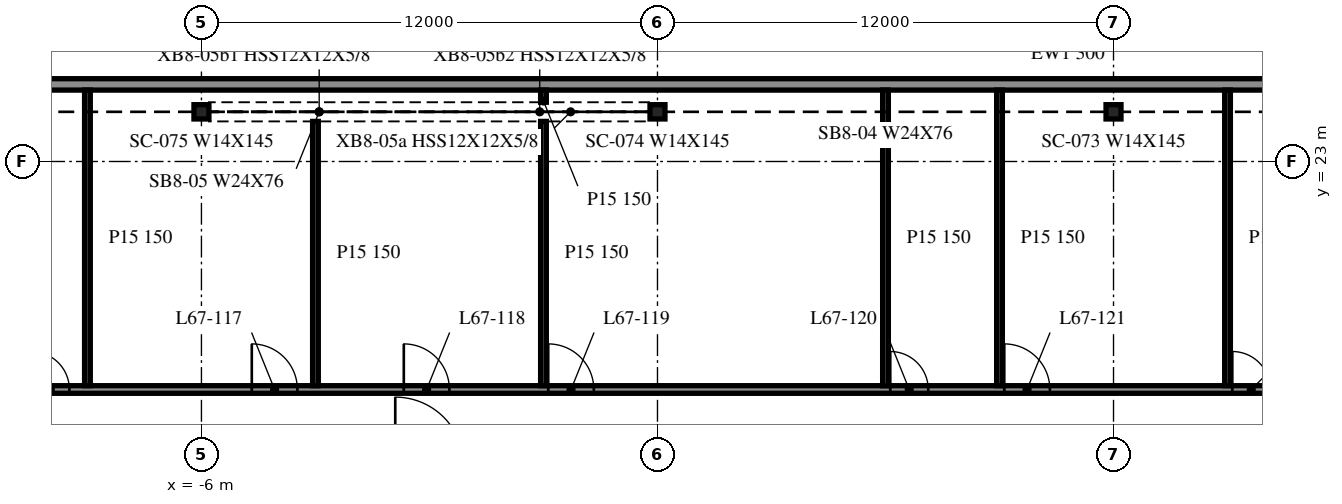
"""IFC4 building model, lengths in metres.
Left out: names, types, materials, properties, quantities, classifications, styles, units other than length and angle.
Written with IfcOpenShell. Run it as: python <this file> out.ifc"""

import sys

from ifc_helpers import new_model, si_unit, direction, frame, frame_2d, origin, origin_2d, place, context, subcontext, project, spatial, rectangle, i_section, extrude, element, fill, save


model = new_model("IFC4")
c1 = context("Model", 3, precision=1e-05, world=origin(), true_north=direction((0.0, 1.0)))
c2 = subcontext(c1, "Body", "Model", "MODEL_VIEW")
j1 = project(units=[si_unit("LENGTHUNIT", "METRE"), si_unit("PLANEANGLEUNIT", "RADIAN")], contexts=[c1])
p1 = place(None, origin())
s1 = spatial("IfcSite", under=j1, at=p1, CompositionType="ELEMENT")
p2 = place(p1, origin())
s2 = spatial("IfcBuilding", under=s1, at=p2, CompositionType="ELEMENT")
p3 = place(p2, frame((0.0, 0.0, 274.7)))
s3 = spatial("IfcBuildingStorey", under=s2, at=p3, CompositionType="ELEMENT", Elevation=274.7)
for number, where, z_axis, x_axis in (
    (1, (18.0, 24.307, -0.34), (0.0, 0.0, 1.0), (1.0, 0.0, 0.0)),
    (2, (6.0, 24.307, -0.34), (0.0, 0.0, 1.0), (1.0, 0.0, 0.0)),
    (3, (-6.0, 24.307, -0.34), (0.0, 0.0, 1.0), (1.0, 0.0, 0.0)),
):
    element("IfcColumn", number, at=place(p3, frame(where, z_axis=z_axis, x_axis=x_axis)), inside=s3, PredefinedType="COLUMN", context=c2, shape_type="SweptSolid", body=[
        extrude(i_section(OverallWidth=0.394, OverallDepth=0.376, WebThickness=0.017, FlangeThickness=0.028, at=origin_2d()), origin(), (0.0, 0.0, 1.0), 3.8),
    ])
p4 = place(p3, frame((42.0, 25.029, 0.0), z_axis=(0.0, 0.0, 1.0), x_axis=(-1.0, 0.0, 0.0)))
e4 = element("IfcWall", 4, at=p4, inside=s3, PredefinedType="NOTDEFINED", context=c2, shape_type="SweptSolid", body=[
    extrude(rectangle(XDim=84.0, YDim=0.3, at=frame_2d((42.0, 0.0))), origin(), (0.0, 0.0, 1.0), 2.853),
])
p5 = place(p3, frame((-47.975, 17.0, 0.0), z_axis=(0.0, 0.0, 1.0), x_axis=(1.0, 0.0, 0.0)))
e5 = element("IfcWall", 5, at=p5, inside=s3, PredefinedType="PARTITIONING", context=c2, shape_type="SweptSolid", body=[
    extrude(rectangle(XDim=95.95, YDim=0.2, at=frame_2d((47.975, 0.0))), origin(), (0.0, 0.0, 1.0), 3.46),
])
p6 = place(p5, frame((7.3, 0.0, 0.0)))
e6 = element("IfcOpeningElement", 6, at=p6, cuts=e5, PredefinedType="OPENING", context=c2, shape_type="SweptSolid", body=[
    extrude(rectangle(XDim=1.2, YDim=2.1, at=frame_2d((0.6, 1.05))), frame((0.0, 0.11, 0.0), z_axis=(0.0, -1.0, 0.0), x_axis=(1.0, 0.0, 0.0)), (0.0, 0.0, 1.0), 0.22),
])
p7 = place(p5, frame((13.3, 0.0, 0.0)))
e7 = element("IfcOpeningElement", 7, at=p7, cuts=e5, PredefinedType="OPENING", context=c2, shape_type="SweptSolid", body=[
    extrude(rectangle(XDim=1.2, YDim=2.1, at=frame_2d((0.6, 1.05))), frame((0.0, 0.11, 0.0), z_axis=(0.0, -1.0, 0.0), x_axis=(1.0, 0.0, 0.0)), (0.0, 0.0, 1.0), 0.22),
])
p8 = place(p5, frame((19.3, 0.0, 0.0)))
e8 = element("IfcOpeningElement", 8, at=p8, cuts=e5, PredefinedType="OPENING", context=c2, shape_type="SweptSolid", body=[
    extrude(rectangle(XDim=1.2, YDim=2.1, at=frame_2d((0.6, 1.05))), frame((0.0, 0.11, 0.0), z_axis=(0.0, -1.0, 0.0), x_axis=(1.0, 0.0, 0.0)), (0.0, 0.0, 1.0), 0.22),
])
p9 = place(p5, frame((28.5, 0.0, 0.0)))
e9 = element("IfcOpeningElement", 9, at=p9, cuts=e5, PredefinedType="OPENING", context=c2, shape_type="SweptSolid", body=[
    extrude(rectangle(XDim=1.0, YDim=2.1, at=frame_2d((0.5, 1.05))), frame((0.0, 0.11, 0.0), z_axis=(0.0, -1.0, 0.0), x_axis=(1.0, 0.0, 0.0)), (0.0, 0.0, 1.0), 0.22),
])
p10 = place(p5, frame((31.3, 0.0, 0.0)))
e10 = element("IfcOpeningElement", 10, at=p10, cuts=e5, PredefinedType="OPENING", context=c2, shape_type="SweptSolid", body=[
    extrude(rectangle(XDim=1.2, YDim=2.1, at=frame_2d((0.6, 1.05))), frame((0.0, 0.11, 0.0), z_axis=(0.0, -1.0, 0.0), x_axis=(1.0, 0.0, 0.0)), (0.0, 0.0, 1.0), 0.22),
])
p11 = place(p5, frame((37.5, 0.0, 0.0)))
e11 = element("IfcOpeningElement", 11, at=p11, cuts=e5, PredefinedType="OPENING", context=c2, shape_type="SweptSolid", body=[
    extrude(rectangle(XDim=1.0, YDim=2.1, at=frame_2d((0.5, 1.05))), frame((0.0, 0.11, 0.0), z_axis=(0.0, -1.0, 0.0), x_axis=(1.0, 0.0, 0.0)), (0.0, 0.0, 1.0), 0.22),
])
p12 = place(p5, frame((43.3, 0.0, 0.0)))
e12 = element("IfcOpeningElement", 12, at=p12, cuts=e5, PredefinedType="OPENING", context=c2, shape_type="SweptSolid", body=[
    extrude(rectangle(XDim=1.2, YDim=2.1, at=frame_2d((0.6, 1.05))), frame((0.0, 0.11, 0.0), z_axis=(0.0, -1.0, 0.0), x_axis=(1.0, 0.0, 0.0)), (0.0, 0.0, 1.0), 0.22),
])
p13 = place(p5, frame((47.3, 0.0, 0.0)))
e13 = element("IfcOpeningElement", 13, at=p13, cuts=e5, PredefinedType="OPENING", context=c2, shape_type="SweptSolid", body=[
    extrude(rectangle(XDim=1.2, YDim=2.1, at=frame_2d((0.6, 1.05))), frame((0.0, 0.11, 0.0), z_axis=(0.0, -1.0, 0.0), x_axis=(1.0, 0.0, 0.0)), (0.0, 0.0, 1.0), 0.22),
])
p14 = place(p5, frame((51.1, 0.0, 0.0)))
e14 = element("IfcOpeningElement", 14, at=p14, cuts=e5, PredefinedType="OPENING", context=c2, shape_type="SweptSolid", body=[
    extrude(rectangle(XDim=1.2, YDim=2.1, at=frame_2d((0.6, 1.05))), frame((0.0, 0.11, 0.0), z_axis=(0.0, -1.0, 0.0), x_axis=(1.0, 0.0, 0.0)), (0.0, 0.0, 1.0), 0.22),
])
p15 = place(p5, frame((60.1, 0.0, 0.0)))
e15 = element("IfcOpeningElement", 15, at=p15, cuts=e5, PredefinedType="OPENING", context=c2, shape_type="SweptSolid", body=[
    extrude(rectangle(XDim=1.0, YDim=2.1, at=frame_2d((0.5, 1.05))), frame((0.0, 0.11, 0.0), z_axis=(0.0, -1.0, 0.0), x_axis=(1.0, 0.0, 0.0)), (0.0, 0.0, 1.0), 0.22),
])
p16 = place(p5, frame((63.1, 0.0, 0.0)))
e16 = element("IfcOpeningElement", 16, at=p16, cuts=e5, PredefinedType="OPENING", context=c2, shape_type="SweptSolid", body=[
    extrude(rectangle(XDim=1.2, YDim=2.1, at=frame_2d((0.6, 1.05))), frame((0.0, 0.11, 0.0), z_axis=(0.0, -1.0, 0.0), x_axis=(1.0, 0.0, 0.0)), (0.0, 0.0, 1.0), 0.22),
])
p17 = place(p5, frame((69.1, 0.0, 0.0)))
e17 = element("IfcOpeningElement", 17, at=p17, cuts=e5, PredefinedType="OPENING", context=c2, shape_type="SweptSolid", body=[
    extrude(rectangle(XDim=1.0, YDim=2.1, at=frame_2d((0.5, 1.05))), frame((0.0, 0.11, 0.0), z_axis=(0.0, -1.0, 0.0), x_axis=(1.0, 0.0, 0.0)), (0.0, 0.0, 1.0), 0.22),
])
p18 = place(p5, frame((75.1, 0.0, 0.0)))
e18 = element("IfcOpeningElement", 18, at=p18, cuts=e5, PredefinedType="OPENING", context=c2, shape_type="SweptSolid", body=[
    extrude(rectangle(XDim=1.2, YDim=2.1, at=frame_2d((0.6, 1.05))), frame((0.0, 0.11, 0.0), z_axis=(0.0, -1.0, 0.0), x_axis=(1.0, 0.0, 0.0)), (0.0, 0.0, 1.0), 0.22),
])
p19 = place(p5, frame((81.1, 0.0, 0.0)))
e19 = element("IfcOpeningElement", 19, at=p19, cuts=e5, PredefinedType="OPENING", context=c2, shape_type="SweptSolid", body=[
    extrude(rectangle(XDim=1.2, YDim=2.1, at=frame_2d((0.6, 1.05))), frame((0.0, 0.11, 0.0), z_axis=(0.0, -1.0, 0.0), x_axis=(1.0, 0.0, 0.0)), (0.0, 0.0, 1.0), 0.22),
])
p20 = place(p5, frame((90.1, 0.0, 0.0)))
e20 = element("IfcOpeningElement", 20, at=p20, cuts=e5, PredefinedType="OPENING", context=c2, shape_type="SweptSolid", body=[
    extrude(rectangle(XDim=1.2, YDim=2.1, at=frame_2d((0.6, 1.05))), frame((0.0, 0.11, 0.0), z_axis=(0.0, -1.0, 0.0), x_axis=(1.0, 0.0, 0.0)), (0.0, 0.0, 1.0), 0.22),
])
p21 = place(p3, frame((-9.0, 17.1, 0.0), z_axis=(0.0, 0.0, 1.0), x_axis=(0.0, 1.0, 0.0)))
e21 = element("IfcWall", 21, at=p21, inside=s3, PredefinedType="PARTITIONING", context=c2, shape_type="SweptSolid", body=[
    extrude(rectangle(XDim=7.779, YDim=0.15, at=frame_2d((3.889, 0.0))), origin(), (0.0, 0.0, 1.0), 3.46),
])
for number, where, z_axis, x_axis in (
    (22, (-3.0, 17.1, 0.0), (0.0, 0.0, 1.0), (0.0, 1.0, 0.0)),
    (23, (3.0, 17.1, 0.0), (0.0, 0.0, 1.0), (0.0, 1.0, 0.0)),
):
    element("IfcWall", number, at=place(p3, frame(where, z_axis=z_axis, x_axis=x_axis)), inside=s3, PredefinedType="PARTITIONING", context=c2, shape_type="SweptSolid", body=[
        extrude(rectangle(XDim=6.955, YDim=0.15, at=frame_2d((3.477, 0.0))), origin(), (0.0, 0.0, 1.0), 3.46),
    ])
p22 = place(p3, frame((3.0, 24.559, 0.0), z_axis=(0.0, 0.0, 1.0), x_axis=(0.0, 1.0, 0.0)))
e24 = element("IfcWall", 24, at=p22, inside=s3, PredefinedType="PARTITIONING", context=c2, shape_type="SweptSolid", body=[
    extrude(rectangle(XDim=0.32, YDim=0.15, at=frame_2d((0.16, 0.0))), origin(), (0.0, 0.0, 1.0), 3.46),
])
for number, where, z_axis, x_axis in (
    (25, (12.0, 17.1, 0.0), (0.0, 0.0, 1.0), (0.0, 1.0, 0.0)),
    (26, (15.0, 17.1, 0.0), (0.0, 0.0, 1.0), (0.0, 1.0, 0.0)),
    (27, (21.0, 17.1, 0.0), (0.0, 0.0, 1.0), (0.0, 1.0, 0.0)),
):
    element("IfcWall", number, at=place(p3, frame(where, z_axis=z_axis, x_axis=x_axis)), inside=s3, PredefinedType="PARTITIONING", context=c2, shape_type="SweptSolid", body=[
        extrude(rectangle(XDim=7.779, YDim=0.15, at=frame_2d((3.889, 0.0))), origin(), (0.0, 0.0, 1.0), 3.46),
    ])
p23 = place(p11, origin())
e28 = element("IfcDoor", 28, at=p23, inside=s3, OperationType="SINGLE_SWING_LEFT", PredefinedType="DOOR", context=c2, shape_type="SweptSolid", body=[
    extrude(rectangle(XDim=1.0, YDim=2.1, at=frame_2d((0.5, 1.05))), frame((0.0, 0.025, 0.0), z_axis=(0.0, -1.0, 0.0), x_axis=(1.0, 0.0, 0.0)), (0.0, 0.0, 1.0), 0.05),
])
fill(e11, e28)
p24 = place(p12, origin())
e29 = element("IfcDoor", 29, at=p24, inside=s3, OperationType="SINGLE_SWING_LEFT", PredefinedType="DOOR", context=c2, shape_type="SweptSolid", body=[
    extrude(rectangle(XDim=1.2, YDim=2.1, at=frame_2d((0.6, 1.05))), frame((0.0, 0.025, 0.0), z_axis=(0.0, -1.0, 0.0), x_axis=(1.0, 0.0, 0.0)), (0.0, 0.0, 1.0), 0.05),
])
fill(e12, e29)
p25 = place(p13, origin())
e30 = element("IfcDoor", 30, at=p25, inside=s3, OperationType="SINGLE_SWING_RIGHT", PredefinedType="DOOR", context=c2, shape_type="SweptSolid", body=[
    extrude(rectangle(XDim=1.2, YDim=2.1, at=frame_2d((0.6, 1.05))), frame((0.0, 0.025, 0.0), z_axis=(0.0, -1.0, 0.0), x_axis=(1.0, 0.0, 0.0)), (0.0, 0.0, 1.0), 0.05),
])
fill(e13, e30)
p26 = place(p14, origin())
e31 = element("IfcDoor", 31, at=p26, inside=s3, OperationType="SINGLE_SWING_RIGHT", PredefinedType="DOOR", context=c2, shape_type="SweptSolid", body=[
    extrude(rectangle(XDim=1.2, YDim=2.1, at=frame_2d((0.6, 1.05))), frame((0.0, 0.025, 0.0), z_axis=(0.0, -1.0, 0.0), x_axis=(1.0, 0.0, 0.0)), (0.0, 0.0, 1.0), 0.05),
])
fill(e14, e31)
p27 = place(p15, origin())
e32 = element("IfcDoor", 32, at=p27, inside=s3, OperationType="SINGLE_SWING_RIGHT", PredefinedType="DOOR", context=c2, shape_type="SweptSolid", body=[
    extrude(rectangle(XDim=1.0, YDim=2.1, at=frame_2d((0.5, 1.05))), frame((0.0, 0.025, 0.0), z_axis=(0.0, -1.0, 0.0), x_axis=(1.0, 0.0, 0.0)), (0.0, 0.0, 1.0), 0.05),
])
fill(e15, e32)
p28 = place(p16, origin())
e33 = element("IfcDoor", 33, at=p28, inside=s3, OperationType="SINGLE_SWING_RIGHT", PredefinedType="DOOR", context=c2, shape_type="SweptSolid", body=[
    extrude(rectangle(XDim=1.2, YDim=2.1, at=frame_2d((0.6, 1.05))), frame((0.0, 0.025, 0.0), z_axis=(0.0, -1.0, 0.0), x_axis=(1.0, 0.0, 0.0)), (0.0, 0.0, 1.0), 0.05),
])
fill(e16, e33)
p29 = place(p17, origin())
e34 = element("IfcDoor", 34, at=p29, inside=s3, OperationType="SINGLE_SWING_RIGHT", PredefinedType="DOOR", context=c2, shape_type="SweptSolid", body=[
    extrude(rectangle(XDim=1.0, YDim=2.1, at=frame_2d((0.5, 1.05))), frame((0.0, 0.025, 0.0), z_axis=(0.0, -1.0, 0.0), x_axis=(1.0, 0.0, 0.0)), (0.0, 0.0, 1.0), 0.05),
])
fill(e17, e34)
save(model, sys.argv[1])
